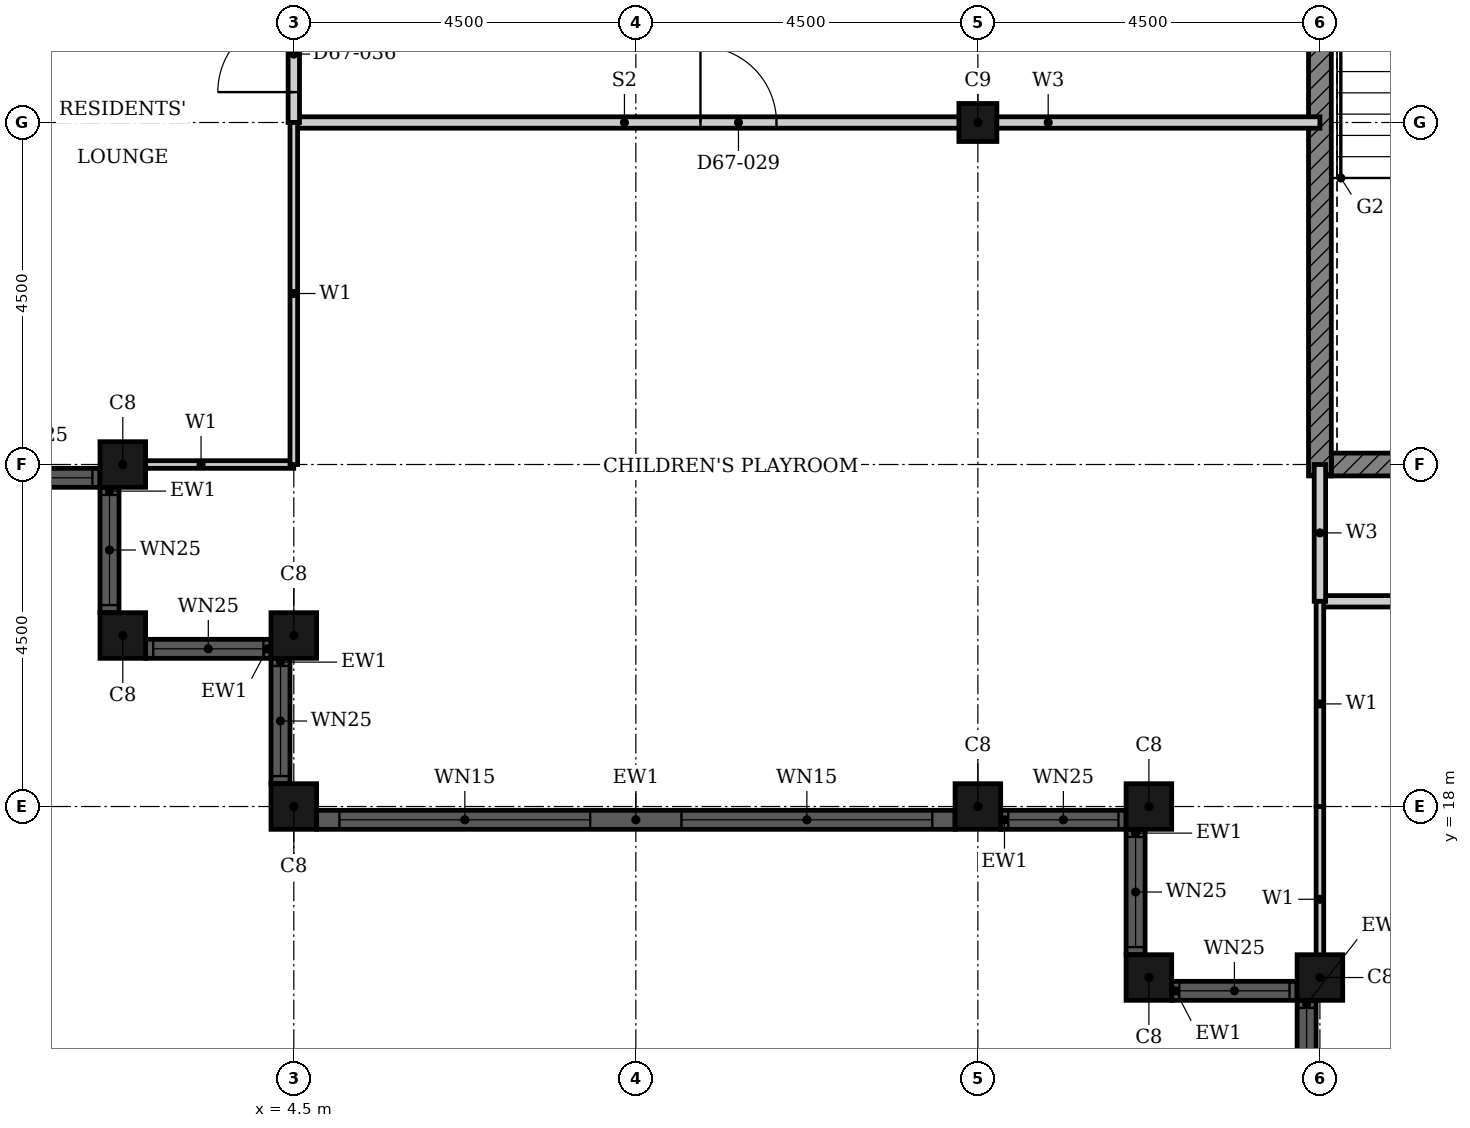
"""IFC4 building model, lengths in metres.
Left out: names, types, materials, properties, quantities, classifications, styles, units other than length and angle.
Written with IfcOpenShell. Run it as: python <this file> out.ifc"""

import sys

from ifc_helpers import new_model, si_unit, direction, frame, frame_2d, origin, origin_2d, place, context, subcontext, project, spatial, rectangle, hollow_rectangle, extrude, element, fill, save


model = new_model("IFC4")
c1 = context("Model", 3, precision=1e-05, world=origin(), true_north=direction((0.0, 1.0)))
c2 = subcontext(c1, "Body", "Model", "MODEL_VIEW")
j1 = project(units=[si_unit("LENGTHUNIT", "METRE"), si_unit("PLANEANGLEUNIT", "RADIAN")], contexts=[c1])
p1 = place(None, origin())
s1 = spatial("IfcSite", under=j1, at=p1, CompositionType="ELEMENT")
p2 = place(p1, origin())
s2 = spatial("IfcBuilding", under=s1, at=p2, CompositionType="ELEMENT")
p3 = place(p2, frame((0.0, 0.0, 263.8)))
s3 = spatial("IfcBuildingStorey", under=s2, at=p3, CompositionType="ELEMENT", Elevation=263.8)
for number, where, z_axis, x_axis in (
    (1, (15.75, 18.0, 0.0), (0.0, 0.0, 1.0), (1.0, 0.0, 0.0)),
    (2, (15.75, 15.75, 0.0), (0.0, 0.0, 1.0), (1.0, 0.0, 0.0)),
    (3, (18.0, 15.75, 0.0), (0.0, 0.0, 1.0), (1.0, 0.0, 0.0)),
    (4, (2.25, 22.5, 0.0), (0.0, 0.0, 1.0), (1.0, 0.0, 0.0)),
    (5, (2.25, 20.25, 0.0), (0.0, 0.0, 1.0), (1.0, 0.0, 0.0)),
    (6, (4.5, 20.25, 0.0), (0.0, 0.0, 1.0), (1.0, 0.0, 0.0)),
    (7, (4.5, 18.0, 0.0), (0.0, 0.0, 1.0), (1.0, 0.0, 0.0)),
    (8, (13.5, 18.0, 0.0), (0.0, 0.0, 1.0), (1.0, 0.0, 0.0)),
):
    element("IfcColumn", number, at=place(p3, frame(where, z_axis=z_axis, x_axis=x_axis)), inside=s3, PredefinedType="COLUMN", context=c2, shape_type="SweptSolid", body=[
        extrude(hollow_rectangle(XDim=0.6, YDim=0.6, WallThickness=0.02, at=origin_2d()), origin(), (0.0, 0.0, 1.0), 3.7),
    ])
p4 = place(p3, frame((13.5, 27.0, 0.0), z_axis=(0.0, 0.0, 1.0), x_axis=(1.0, 0.0, 0.0)))
e9 = element("IfcColumn", 9, at=p4, inside=s3, PredefinedType="COLUMN", context=c2, shape_type="SweptSolid", body=[
    extrude(hollow_rectangle(XDim=0.5, YDim=0.5, WallThickness=0.016, InnerFilletRadius=0.032, OuterFilletRadius=0.048, at=origin_2d()), origin(), (0.0, 0.0, 1.0), 3.7),
])
p5 = place(p3, frame((15.575, 17.7, 0.0), z_axis=(0.0, 0.0, 1.0), x_axis=(0.0, -1.0, 0.0)))
e10 = element("IfcWall", 10, at=p5, inside=s3, PredefinedType="SOLIDWALL", context=c2, shape_type="SweptSolid", body=[
    extrude(rectangle(XDim=1.65, YDim=0.25, at=frame_2d((0.825, 0.0))), origin(), (0.0, 0.0, 1.0), 3.7),
])
p6 = place(p5, frame((0.1, 0.0, 0.9)))
e11 = element("IfcOpeningElement", 11, at=p6, cuts=e10, PredefinedType="OPENING", context=c2, shape_type="SweptSolid", body=[
    extrude(rectangle(XDim=1.45, YDim=1.85, at=frame_2d((0.725, 0.925))), frame((0.0, 0.135, 0.0), z_axis=(0.0, -1.0, 0.0), x_axis=(1.0, 0.0, 0.0)), (0.0, 0.0, 1.0), 0.27),
])
p7 = place(p3, frame((16.05, 15.575, 0.0), z_axis=(0.0, 0.0, 1.0), x_axis=(1.0, 0.0, 0.0)))
e12 = element("IfcWall", 12, at=p7, inside=s3, PredefinedType="SOLIDWALL", context=c2, shape_type="SweptSolid", body=[
    extrude(rectangle(XDim=1.65, YDim=0.25, at=frame_2d((0.825, 0.0))), origin(), (0.0, 0.0, 1.0), 3.7),
])
p8 = place(p7, frame((0.1, 0.0, 0.9)))
e13 = element("IfcOpeningElement", 13, at=p8, cuts=e12, PredefinedType="OPENING", context=c2, shape_type="SweptSolid", body=[
    extrude(rectangle(XDim=1.45, YDim=1.85, at=frame_2d((0.725, 0.925))), frame((0.0, 0.135, 0.0), z_axis=(0.0, -1.0, 0.0), x_axis=(1.0, 0.0, 0.0)), (0.0, 0.0, 1.0), 0.27),
])
p9 = place(p3, frame((17.825, 15.45, 0.0), z_axis=(0.0, 0.0, 1.0), x_axis=(0.0, -1.0, 0.0)))
e14 = element("IfcWall", 14, at=p9, inside=s3, PredefinedType="SOLIDWALL", context=c2, shape_type="SweptSolid", body=[
    extrude(rectangle(XDim=1.65, YDim=0.25, at=frame_2d((0.825, 0.0))), origin(), (0.0, 0.0, 1.0), 3.7),
])
p10 = place(p9, frame((0.1, 0.0, 0.9)))
e15 = element("IfcOpeningElement", 15, at=p10, cuts=e14, PredefinedType="OPENING", context=c2, shape_type="SweptSolid", body=[
    extrude(rectangle(XDim=1.45, YDim=1.85, at=frame_2d((0.725, 0.925))), frame((0.0, 0.135, 0.0), z_axis=(0.0, -1.0, 0.0), x_axis=(1.0, 0.0, 0.0)), (0.0, 0.0, 1.0), 0.27),
])
p11 = place(p3, frame((0.3, 22.325, 0.0), z_axis=(0.0, 0.0, 1.0), x_axis=(1.0, 0.0, 0.0)))
e16 = element("IfcWall", 16, at=p11, inside=s3, PredefinedType="SOLIDWALL", context=c2, shape_type="SweptSolid", body=[
    extrude(rectangle(XDim=1.65, YDim=0.25, at=frame_2d((0.825, 0.0))), origin(), (0.0, 0.0, 1.0), 3.7),
])
p12 = place(p11, frame((0.1, 0.0, 0.9)))
e17 = element("IfcOpeningElement", 17, at=p12, cuts=e16, PredefinedType="OPENING", context=c2, shape_type="SweptSolid", body=[
    extrude(rectangle(XDim=1.45, YDim=1.85, at=frame_2d((0.725, 0.925))), frame((0.0, 0.135, 0.0), z_axis=(0.0, -1.0, 0.0), x_axis=(1.0, 0.0, 0.0)), (0.0, 0.0, 1.0), 0.27),
])
p13 = place(p3, frame((2.075, 22.2, 0.0), z_axis=(0.0, 0.0, 1.0), x_axis=(0.0, -1.0, 0.0)))
e18 = element("IfcWall", 18, at=p13, inside=s3, PredefinedType="SOLIDWALL", context=c2, shape_type="SweptSolid", body=[
    extrude(rectangle(XDim=1.65, YDim=0.25, at=frame_2d((0.825, 0.0))), origin(), (0.0, 0.0, 1.0), 3.7),
])
p14 = place(p13, frame((0.1, 0.0, 0.9)))
e19 = element("IfcOpeningElement", 19, at=p14, cuts=e18, PredefinedType="OPENING", context=c2, shape_type="SweptSolid", body=[
    extrude(rectangle(XDim=1.45, YDim=1.85, at=frame_2d((0.725, 0.925))), frame((0.0, 0.135, 0.0), z_axis=(0.0, -1.0, 0.0), x_axis=(1.0, 0.0, 0.0)), (0.0, 0.0, 1.0), 0.27),
])
p15 = place(p3, frame((2.55, 20.075, 0.0), z_axis=(0.0, 0.0, 1.0), x_axis=(1.0, 0.0, 0.0)))
e20 = element("IfcWall", 20, at=p15, inside=s3, PredefinedType="SOLIDWALL", context=c2, shape_type="SweptSolid", body=[
    extrude(rectangle(XDim=1.65, YDim=0.25, at=frame_2d((0.825, 0.0))), origin(), (0.0, 0.0, 1.0), 3.7),
])
p16 = place(p15, frame((0.1, 0.0, 0.9)))
e21 = element("IfcOpeningElement", 21, at=p16, cuts=e20, PredefinedType="OPENING", context=c2, shape_type="SweptSolid", body=[
    extrude(rectangle(XDim=1.45, YDim=1.85, at=frame_2d((0.725, 0.925))), frame((0.0, 0.135, 0.0), z_axis=(0.0, -1.0, 0.0), x_axis=(1.0, 0.0, 0.0)), (0.0, 0.0, 1.0), 0.27),
])
p17 = place(p3, frame((4.325, 19.95, 0.0), z_axis=(0.0, 0.0, 1.0), x_axis=(0.0, -1.0, 0.0)))
e22 = element("IfcWall", 22, at=p17, inside=s3, PredefinedType="SOLIDWALL", context=c2, shape_type="SweptSolid", body=[
    extrude(rectangle(XDim=1.65, YDim=0.25, at=frame_2d((0.825, 0.0))), origin(), (0.0, 0.0, 1.0), 3.7),
])
p18 = place(p17, frame((0.1, 0.0, 0.9)))
e23 = element("IfcOpeningElement", 23, at=p18, cuts=e22, PredefinedType="OPENING", context=c2, shape_type="SweptSolid", body=[
    extrude(rectangle(XDim=1.45, YDim=1.85, at=frame_2d((0.725, 0.925))), frame((0.0, 0.135, 0.0), z_axis=(0.0, -1.0, 0.0), x_axis=(1.0, 0.0, 0.0)), (0.0, 0.0, 1.0), 0.27),
])
p19 = place(p3, frame((4.8, 17.825, 0.0), z_axis=(0.0, 0.0, 1.0), x_axis=(1.0, 0.0, 0.0)))
e24 = element("IfcWall", 24, at=p19, inside=s3, PredefinedType="SOLIDWALL", context=c2, shape_type="SweptSolid", body=[
    extrude(rectangle(XDim=8.4, YDim=0.25, at=frame_2d((4.2, 0.0))), origin(), (0.0, 0.0, 1.0), 3.7),
])
p20 = place(p19, frame((0.3, 0.0, 0.45)))
e25 = element("IfcOpeningElement", 25, at=p20, cuts=e24, PredefinedType="OPENING", context=c2, shape_type="SweptSolid", body=[
    extrude(rectangle(XDim=3.3, YDim=2.3, at=frame_2d((1.65, 1.15))), frame((0.0, 0.135, 0.0), z_axis=(0.0, -1.0, 0.0), x_axis=(1.0, 0.0, 0.0)), (0.0, 0.0, 1.0), 0.27),
])
p21 = place(p19, frame((4.8, 0.0, 0.45)))
e26 = element("IfcOpeningElement", 26, at=p21, cuts=e24, PredefinedType="OPENING", context=c2, shape_type="SweptSolid", body=[
    extrude(rectangle(XDim=3.3, YDim=2.3, at=frame_2d((1.65, 1.15))), frame((0.0, 0.135, 0.0), z_axis=(0.0, -1.0, 0.0), x_axis=(1.0, 0.0, 0.0)), (0.0, 0.0, 1.0), 0.27),
])
p22 = place(p3, frame((13.8, 17.825, 0.0), z_axis=(0.0, 0.0, 1.0), x_axis=(1.0, 0.0, 0.0)))
e27 = element("IfcWall", 27, at=p22, inside=s3, PredefinedType="SOLIDWALL", context=c2, shape_type="SweptSolid", body=[
    extrude(rectangle(XDim=1.65, YDim=0.25, at=frame_2d((0.825, 0.0))), origin(), (0.0, 0.0, 1.0), 3.7),
])
p23 = place(p22, frame((0.1, 0.0, 0.9)))
e28 = element("IfcOpeningElement", 28, at=p23, cuts=e27, PredefinedType="OPENING", context=c2, shape_type="SweptSolid", body=[
    extrude(rectangle(XDim=1.45, YDim=1.85, at=frame_2d((0.725, 0.925))), frame((0.0, 0.135, 0.0), z_axis=(0.0, -1.0, 0.0), x_axis=(1.0, 0.0, 0.0)), (0.0, 0.0, 1.0), 0.27),
])
p24 = place(p3, frame((18.15, 22.5, 0.0), z_axis=(0.0, 0.0, 1.0), x_axis=(1.0, 0.0, 0.0)))
e29 = element("IfcWall", 29, at=p24, inside=s3, PredefinedType="SHEAR", context=c2, shape_type="SweptSolid", body=[
    extrude(rectangle(XDim=4.225, YDim=0.3, at=frame_2d((2.113, 0.0))), origin(), (0.0, 0.0, 1.0), 3.4),
])
p25 = place(p3, frame((18.0, 22.35, 0.0), z_axis=(0.0, 0.0, 1.0), x_axis=(0.0, 1.0, 0.0)))
e30 = element("IfcWall", 30, at=p25, inside=s3, PredefinedType="SHEAR", context=c2, shape_type="SweptSolid", body=[
    extrude(rectangle(XDim=9.3, YDim=0.3, at=frame_2d((4.65, 0.0))), origin(), (0.0, 0.0, 1.0), 3.4),
])
p26 = place(p3, frame((18.0, 20.7, 0.0), z_axis=(0.0, 0.0, 1.0), x_axis=(1.0, 0.0, 0.0)))
e31 = element("IfcWall", 31, at=p26, inside=s3, PredefinedType="PARTITIONING", context=c2, shape_type="SweptSolid", body=[
    extrude(rectangle(XDim=24.6, YDim=0.15, at=frame_2d((12.3, 0.0))), origin(), (0.0, 0.0, 1.0), 3.4),
])
p27 = place(p26, frame((4.0, 0.0, 0.0)))
e32 = element("IfcOpeningElement", 32, at=p27, cuts=e31, PredefinedType="OPENING", context=c2, shape_type="SweptSolid", body=[
    extrude(rectangle(XDim=1.0, YDim=2.1, at=frame_2d((0.5, 1.05))), frame((0.0, 0.085, 0.0), z_axis=(0.0, -1.0, 0.0), x_axis=(1.0, 0.0, 0.0)), (0.0, 0.0, 1.0), 0.17),
])
p28 = place(p26, frame((13.0, 0.0, 0.0)))
e33 = element("IfcOpeningElement", 33, at=p28, cuts=e31, PredefinedType="OPENING", context=c2, shape_type="SweptSolid", body=[
    extrude(rectangle(XDim=1.0, YDim=2.1, at=frame_2d((0.5, 1.05))), frame((0.0, 0.085, 0.0), z_axis=(0.0, -1.0, 0.0), x_axis=(1.0, 0.0, 0.0)), (0.0, 0.0, 1.0), 0.17),
])
p29 = place(p26, frame((22.3, 0.0, 0.0)))
e34 = element("IfcOpeningElement", 34, at=p29, cuts=e31, PredefinedType="OPENING", context=c2, shape_type="SweptSolid", body=[
    extrude(rectangle(XDim=1.0, YDim=2.2, at=frame_2d((0.5, 1.1))), frame((0.0, 0.085, 0.0), z_axis=(0.0, -1.0, 0.0), x_axis=(1.0, 0.0, 0.0)), (0.0, 0.0, 1.0), 0.17),
])
p30 = place(p3, frame((4.5, 27.0, 0.0), z_axis=(0.0, 0.0, 1.0), x_axis=(1.0, 0.0, 0.0)))
e35 = element("IfcWall", 35, at=p30, inside=s3, PredefinedType="PARTITIONING", context=c2, shape_type="SweptSolid", body=[
    extrude(rectangle(XDim=13.5, YDim=0.15, at=frame_2d((6.75, 0.0))), origin(), (0.0, 0.0, 1.0), 2.68),
])
p31 = place(p30, frame((5.35, 0.0, 0.0)))
e36 = element("IfcOpeningElement", 36, at=p31, cuts=e35, PredefinedType="OPENING", context=c2, shape_type="SweptSolid", body=[
    extrude(rectangle(XDim=1.0, YDim=2.1, at=frame_2d((0.5, 1.05))), frame((0.0, 0.085, 0.0), z_axis=(0.0, -1.0, 0.0), x_axis=(1.0, 0.0, 0.0)), (0.0, 0.0, 1.0), 0.17),
])
p32 = place(p3, frame((18.0, 20.7, 0.0), z_axis=(0.0, 0.0, 1.0), x_axis=(0.0, 1.0, 0.0)))
e37 = element("IfcWall", 37, at=p32, inside=s3, PredefinedType="PARTITIONING", context=c2, shape_type="SweptSolid", body=[
    extrude(rectangle(XDim=1.8, YDim=0.15, at=frame_2d((0.9, 0.0))), origin(), (0.0, 0.0, 1.0), 3.4),
])
p33 = place(p3, frame((4.5, 27.0, 0.0), z_axis=(0.0, 0.0, 1.0), x_axis=(0.0, 1.0, 0.0)))
e38 = element("IfcWall", 38, at=p33, inside=s3, PredefinedType="PARTITIONING", context=c2, shape_type="SweptSolid", body=[
    extrude(rectangle(XDim=1.8, YDim=0.15, at=frame_2d((0.9, 0.0))), origin(), (0.0, 0.0, 1.0), 3.4),
])
p34 = place(p33, frame((0.4, 0.0, 0.0)))
e39 = element("IfcOpeningElement", 39, at=p34, cuts=e38, PredefinedType="OPENING", context=c2, shape_type="SweptSolid", body=[
    extrude(rectangle(XDim=1.0, YDim=2.1, at=frame_2d((0.5, 1.05))), frame((0.0, 0.085, 0.0), z_axis=(0.0, -1.0, 0.0), x_axis=(1.0, 0.0, 0.0)), (0.0, 0.0, 1.0), 0.17),
])
p35 = place(p3, frame((2.06, 22.5, 0.0), z_axis=(0.0, 0.0, 1.0), x_axis=(1.0, 0.0, 0.0)))
e40 = element("IfcWall", 40, at=p35, inside=s3, PredefinedType="PARTITIONING", context=c2, shape_type="SweptSolid", body=[
    extrude(rectangle(XDim=2.439, YDim=0.1, at=frame_2d((1.219, 0.0))), origin(), (0.0, 0.0, 1.0), 2.68),
])
p36 = place(p3, frame((18.0, 15.56, 0.0), z_axis=(0.0, 0.0, 1.0), x_axis=(0.0, 1.0, 0.0)))
e41 = element("IfcWall", 41, at=p36, inside=s3, PredefinedType="PARTITIONING", context=c2, shape_type="SweptSolid", body=[
    extrude(rectangle(XDim=2.439, YDim=0.1, at=frame_2d((1.219, 0.0))), origin(), (0.0, 0.0, 1.0), 3.4),
])
p37 = place(p3, frame((18.0, 18.0, 0.0), z_axis=(0.0, 0.0, 1.0), x_axis=(0.0, 1.0, 0.0)))
e42 = element("IfcWall", 42, at=p37, inside=s3, PredefinedType="PARTITIONING", context=c2, shape_type="SweptSolid", body=[
    extrude(rectangle(XDim=2.7, YDim=0.1, at=frame_2d((1.35, 0.0))), origin(), (0.0, 0.0, 1.0), 3.4),
])
p38 = place(p3, frame((4.5, 22.5, 0.0), z_axis=(0.0, 0.0, 1.0), x_axis=(0.0, 1.0, 0.0)))
e43 = element("IfcWall", 43, at=p38, inside=s3, PredefinedType="PARTITIONING", context=c2, shape_type="SweptSolid", body=[
    extrude(rectangle(XDim=4.5, YDim=0.1, at=frame_2d((2.25, 0.0))), origin(), (0.0, 0.0, 1.0), 3.4),
])
p39 = place(p6, origin())
e44 = element("IfcWindow", 44, at=p39, inside=s3, PartitioningType="SINGLE_PANEL", PredefinedType="WINDOW", context=c2, shape_type="SweptSolid", body=[
    extrude(rectangle(XDim=1.45, YDim=1.85, at=frame_2d((0.725, 0.925))), frame((0.0, 0.03, 0.0), z_axis=(0.0, -1.0, 0.0), x_axis=(1.0, 0.0, 0.0)), (0.0, 0.0, 1.0), 0.06),
])
fill(e11, e44)
p40 = place(p8, origin())
e45 = element("IfcWindow", 45, at=p40, inside=s3, PartitioningType="SINGLE_PANEL", PredefinedType="WINDOW", context=c2, shape_type="SweptSolid", body=[
    extrude(rectangle(XDim=1.45, YDim=1.85, at=frame_2d((0.725, 0.925))), frame((0.0, 0.03, 0.0), z_axis=(0.0, -1.0, 0.0), x_axis=(1.0, 0.0, 0.0)), (0.0, 0.0, 1.0), 0.06),
])
fill(e13, e45)
p41 = place(p10, origin())
e46 = element("IfcWindow", 46, at=p41, inside=s3, PartitioningType="SINGLE_PANEL", PredefinedType="WINDOW", context=c2, shape_type="SweptSolid", body=[
    extrude(rectangle(XDim=1.45, YDim=1.85, at=frame_2d((0.725, 0.925))), frame((0.0, 0.03, 0.0), z_axis=(0.0, -1.0, 0.0), x_axis=(1.0, 0.0, 0.0)), (0.0, 0.0, 1.0), 0.06),
])
fill(e15, e46)
p42 = place(p12, origin())
e47 = element("IfcWindow", 47, at=p42, inside=s3, PartitioningType="SINGLE_PANEL", PredefinedType="WINDOW", context=c2, shape_type="SweptSolid", body=[
    extrude(rectangle(XDim=1.45, YDim=1.85, at=frame_2d((0.725, 0.925))), frame((0.0, 0.03, 0.0), z_axis=(0.0, -1.0, 0.0), x_axis=(1.0, 0.0, 0.0)), (0.0, 0.0, 1.0), 0.06),
])
fill(e17, e47)
p43 = place(p14, origin())
e48 = element("IfcWindow", 48, at=p43, inside=s3, PartitioningType="SINGLE_PANEL", PredefinedType="WINDOW", context=c2, shape_type="SweptSolid", body=[
    extrude(rectangle(XDim=1.45, YDim=1.85, at=frame_2d((0.725, 0.925))), frame((0.0, 0.03, 0.0), z_axis=(0.0, -1.0, 0.0), x_axis=(1.0, 0.0, 0.0)), (0.0, 0.0, 1.0), 0.06),
])
fill(e19, e48)
p44 = place(p16, origin())
e49 = element("IfcWindow", 49, at=p44, inside=s3, PartitioningType="SINGLE_PANEL", PredefinedType="WINDOW", context=c2, shape_type="SweptSolid", body=[
    extrude(rectangle(XDim=1.45, YDim=1.85, at=frame_2d((0.725, 0.925))), frame((0.0, 0.03, 0.0), z_axis=(0.0, -1.0, 0.0), x_axis=(1.0, 0.0, 0.0)), (0.0, 0.0, 1.0), 0.06),
])
fill(e21, e49)
p45 = place(p18, origin())
e50 = element("IfcWindow", 50, at=p45, inside=s3, PartitioningType="SINGLE_PANEL", PredefinedType="WINDOW", context=c2, shape_type="SweptSolid", body=[
    extrude(rectangle(XDim=1.45, YDim=1.85, at=frame_2d((0.725, 0.925))), frame((0.0, 0.03, 0.0), z_axis=(0.0, -1.0, 0.0), x_axis=(1.0, 0.0, 0.0)), (0.0, 0.0, 1.0), 0.06),
])
fill(e23, e50)
p46 = place(p20, origin())
e51 = element("IfcWindow", 51, at=p46, inside=s3, PartitioningType="SINGLE_PANEL", PredefinedType="WINDOW", context=c2, shape_type="SweptSolid", body=[
    extrude(rectangle(XDim=3.3, YDim=2.3, at=frame_2d((1.65, 1.15))), frame((0.0, 0.03, 0.0), z_axis=(0.0, -1.0, 0.0), x_axis=(1.0, 0.0, 0.0)), (0.0, 0.0, 1.0), 0.06),
])
fill(e25, e51)
p47 = place(p21, origin())
e52 = element("IfcWindow", 52, at=p47, inside=s3, PartitioningType="SINGLE_PANEL", PredefinedType="WINDOW", context=c2, shape_type="SweptSolid", body=[
    extrude(rectangle(XDim=3.3, YDim=2.3, at=frame_2d((1.65, 1.15))), frame((0.0, 0.03, 0.0), z_axis=(0.0, -1.0, 0.0), x_axis=(1.0, 0.0, 0.0)), (0.0, 0.0, 1.0), 0.06),
])
fill(e26, e52)
p48 = place(p23, origin())
e53 = element("IfcWindow", 53, at=p48, inside=s3, PartitioningType="SINGLE_PANEL", PredefinedType="WINDOW", context=c2, shape_type="SweptSolid", body=[
    extrude(rectangle(XDim=1.45, YDim=1.85, at=frame_2d((0.725, 0.925))), frame((0.0, 0.03, 0.0), z_axis=(0.0, -1.0, 0.0), x_axis=(1.0, 0.0, 0.0)), (0.0, 0.0, 1.0), 0.06),
])
fill(e28, e53)
p49 = place(p31, origin())
e54 = element("IfcDoor", 54, at=p49, inside=s3, OperationType="SINGLE_SWING_LEFT", PredefinedType="DOOR", context=c2, shape_type="SweptSolid", body=[
    extrude(rectangle(XDim=1.0, YDim=2.1, at=frame_2d((0.5, 1.05))), frame((0.0, 0.025, 0.0), z_axis=(0.0, -1.0, 0.0), x_axis=(1.0, 0.0, 0.0)), (0.0, 0.0, 1.0), 0.05),
])
fill(e36, e54)
p50 = place(p34, origin())
e55 = element("IfcDoor", 55, at=p50, inside=s3, OperationType="SINGLE_SWING_LEFT", PredefinedType="DOOR", context=c2, shape_type="SweptSolid", body=[
    extrude(rectangle(XDim=1.0, YDim=2.1, at=frame_2d((0.5, 1.05))), frame((0.0, 0.025, 0.0), z_axis=(0.0, -1.0, 0.0), x_axis=(1.0, 0.0, 0.0)), (0.0, 0.0, 1.0), 0.05),
])
fill(e39, e55)
save(model, sys.argv[1])
